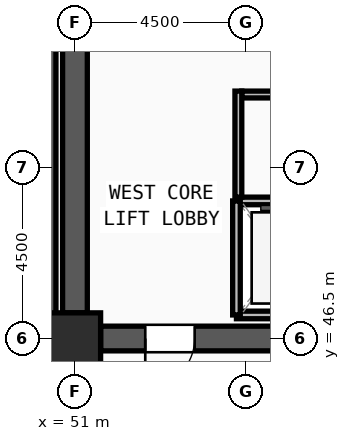
"""IFC4 building model, lengths in metres.
Left out: names, types, materials, properties, quantities, classifications, styles, units other than length and angle.
Written with IfcOpenShell. Run it as: python <this file> out.ifc"""

import sys

from ifc_helpers import new_model, si_unit, direction, frame, frame_2d, origin, origin_2d, place, context, subcontext, project, spatial, rectangle, extrude, source, transform, mapped, element, fill, save


model = new_model("IFC4")
c1 = context("Model", 3, precision=1e-05, world=origin(), true_north=direction((0.0, 1.0)))
c2 = subcontext(c1, "Body", "Model", "MODEL_VIEW")
j1 = project(units=[si_unit("LENGTHUNIT", "METRE"), si_unit("PLANEANGLEUNIT", "RADIAN")], contexts=[c1])
p1 = place(None, origin())
s1 = spatial("IfcSite", under=j1, at=p1, CompositionType="ELEMENT")
p2 = place(p1, origin())
s2 = spatial("IfcBuilding", under=s1, at=p2, CompositionType="ELEMENT")
p3 = place(p2, frame((0.0, 0.0, 236.25)))
s3 = spatial("IfcBuildingStorey", under=s2, at=p3, CompositionType="ELEMENT", Elevation=236.25)
m1 = source(origin(), c2, "Body", "SweptSolid", [
    extrude(rectangle(XDim=1.35, YDim=1.35, at=origin_2d()), origin(), (0.0, 0.0, 1.0), 3.75),
])
p4 = place(p3, frame((51.0, 46.5, 0.0), z_axis=(0.0, 0.0, 1.0), x_axis=(1.0, 0.0, 0.0)))
e1 = element("IfcColumn", 1, at=p4, inside=s3, PredefinedType="COLUMN", context=c2, shape_type="MappedRepresentation", body=[
    mapped(m1, transform((0.0, 0.0, 0.0), x_axis=(1.0, 0.0, 0.0), y_axis=(0.0, 1.0, 0.0), z_axis=(0.0, 0.0, 1.0), scale=1.0)),
])
p5 = place(p3, frame((59.325, 46.5, 0.0), z_axis=(0.0, 0.0, 1.0), x_axis=(-1.0, 0.0, 0.0)))
e2 = element("IfcWall", 2, at=p5, inside=s3, PredefinedType="SHEAR", context=c2, shape_type="SweptSolid", body=[
    extrude(rectangle(XDim=7.65, YDim=0.65, at=frame_2d((3.825, 0.0))), origin(), (0.0, 0.0, 1.0), 3.57),
])
m2 = source(origin(), c2, "Body", "SweptSolid", [
    extrude(rectangle(XDim=1.3, YDim=2.2, at=frame_2d((0.65, 1.1))), frame((0.0, 0.335, 0.0), z_axis=(0.0, -1.0, 0.0), x_axis=(1.0, 0.0, 0.0)), (0.0, 0.0, 1.0), 0.67),
])
p6 = place(p5, frame((5.175, 0.0, 0.0)))
e3 = element("IfcOpeningElement", 3, at=p6, cuts=e2, PredefinedType="OPENING", context=c2, shape_type="MappedRepresentation", body=[
    mapped(m2, transform((0.0, 0.0, 0.0), x_axis=(1.0, 0.0, 0.0), y_axis=(0.0, 1.0, 0.0), z_axis=(0.0, 0.0, 1.0), scale=1.0)),
])
m3 = source(origin(), c2, "Body", "SweptSolid", [
    extrude(rectangle(XDim=1.0, YDim=2.2, at=frame_2d((0.5, 1.1))), frame((0.0, 0.335, 0.0), z_axis=(0.0, -1.0, 0.0), x_axis=(1.0, 0.0, 0.0)), (0.0, 0.0, 1.0), 0.67),
])
p7 = place(p5, frame((0.675, 0.0, 0.0)))
e4 = element("IfcOpeningElement", 4, at=p7, cuts=e2, PredefinedType="OPENING", context=c2, shape_type="MappedRepresentation", body=[
    mapped(m3, transform((0.0, 0.0, 0.0), x_axis=(1.0, 0.0, 0.0), y_axis=(0.0, 1.0, 0.0), z_axis=(0.0, 0.0, 1.0), scale=1.0)),
])
p8 = place(p3, frame((51.0, 47.175, 0.0), z_axis=(0.0, 0.0, 1.0), x_axis=(0.0, 1.0, 0.0)))
e5 = element("IfcWall", 5, at=p8, inside=s3, PredefinedType="SHEAR", context=c2, shape_type="SweptSolid", body=[
    extrude(rectangle(XDim=13.65, YDim=0.65, at=frame_2d((6.825, 0.0))), origin(), (0.0, 0.0, 1.0), 3.57),
])
p9 = place(p3, frame((50.38, 46.7, 0.0), z_axis=(0.0, 0.0, 1.0), x_axis=(0.0, 1.0, 0.0)))
e6 = element("IfcWall", 6, at=p9, inside=s3, PredefinedType="SOLIDWALL", context=c2, shape_type="SweptSolid", body=[
    extrude(rectangle(XDim=7.82, YDim=0.24, at=frame_2d((3.91, 0.0))), origin(), (0.0, 0.0, 1.0), 3.57),
])
for number, where, z_axis, x_axis in (
    (7, (55.25, 47.12, 0.0), (0.0, 0.0, 1.0), (1.0, 0.0, 0.0)),
    (8, (57.65, 50.12, 0.0), (0.0, 0.0, 1.0), (-1.0, 0.0, 0.0)),
):
    element("IfcWall", number, at=place(p3, frame(where, z_axis=z_axis, x_axis=x_axis)), inside=s3, PredefinedType="SOLIDWALL", context=c2, shape_type="SweptSolid", body=[
        extrude(rectangle(XDim=2.4, YDim=0.2, at=frame_2d((1.2, 0.0))), origin(), (0.0, 0.0, 1.0), 3.57),
    ])
p10 = place(p3, frame((55.25, 50.12, 0.0), z_axis=(0.0, 0.0, 1.0), x_axis=(0.0, -1.0, 0.0)))
e9 = element("IfcWall", 9, at=p10, inside=s3, PredefinedType="SOLIDWALL", context=c2, shape_type="SweptSolid", body=[
    extrude(rectangle(XDim=3.0, YDim=0.2, at=frame_2d((1.5, 0.0))), origin(), (0.0, 0.0, 1.0), 3.57),
])
p11 = place(p3, frame((55.39, 52.92, 0.0), z_axis=(0.0, 0.0, 1.0), x_axis=(1.0, 0.0, 0.0)))
e10 = element("IfcWall", 10, at=p11, inside=s3, PredefinedType="PARTITIONING", context=c2, shape_type="SweptSolid", body=[
    extrude(rectangle(XDim=9.22, YDim=0.18, at=frame_2d((4.61, 0.0))), origin(), (0.0, 0.0, 1.0), 3.57),
])
m4 = source(origin(), c2, "Body", "SweptSolid", [
    extrude(rectangle(XDim=0.85, YDim=2.1, at=frame_2d((0.425, 1.05))), frame((0.0, 0.1, 0.0), z_axis=(0.0, -1.0, 0.0), x_axis=(1.0, 0.0, 0.0)), (0.0, 0.0, 1.0), 0.2),
])
p12 = place(p11, frame((4.185, 0.0, 0.0)))
e11 = element("IfcOpeningElement", 11, at=p12, cuts=e10, PredefinedType="OPENING", context=c2, shape_type="MappedRepresentation", body=[
    mapped(m4, transform((0.0, 0.0, 0.0), x_axis=(1.0, 0.0, 0.0), y_axis=(0.0, 1.0, 0.0), z_axis=(0.0, 0.0, 1.0), scale=1.0)),
])
p13 = place(p3, frame((55.3, 50.22, 0.0), z_axis=(0.0, 0.0, 1.0), x_axis=(0.0, 1.0, 0.0)))
e12 = element("IfcWall", 12, at=p13, inside=s3, PredefinedType="PARTITIONING", context=c2, shape_type="SweptSolid", body=[
    extrude(rectangle(XDim=2.79, YDim=0.18, at=frame_2d((1.395, 0.0))), origin(), (0.0, 0.0, 1.0), 3.57),
])
m5 = source(origin(), c2, "Body", "SweptSolid", [
    extrude(rectangle(XDim=1.3, YDim=2.2, at=frame_2d((0.65, 1.1))), frame((0.0, 0.025, 0.0), z_axis=(0.0, -1.0, 0.0), x_axis=(1.0, 0.0, 0.0)), (0.0, 0.0, 1.0), 0.05),
])
p14 = place(p6, origin())
e13 = element("IfcDoor", 13, at=p14, inside=s3, OperationType="SINGLE_SWING_RIGHT", PredefinedType="DOOR", context=c2, shape_type="MappedRepresentation", body=[
    mapped(m5, transform((0.0, 0.0, 0.0), x_axis=(1.0, 0.0, 0.0), y_axis=(0.0, 1.0, 0.0), z_axis=(0.0, 0.0, 1.0), scale=1.0)),
])
fill(e3, e13)
save(model, sys.argv[1])
